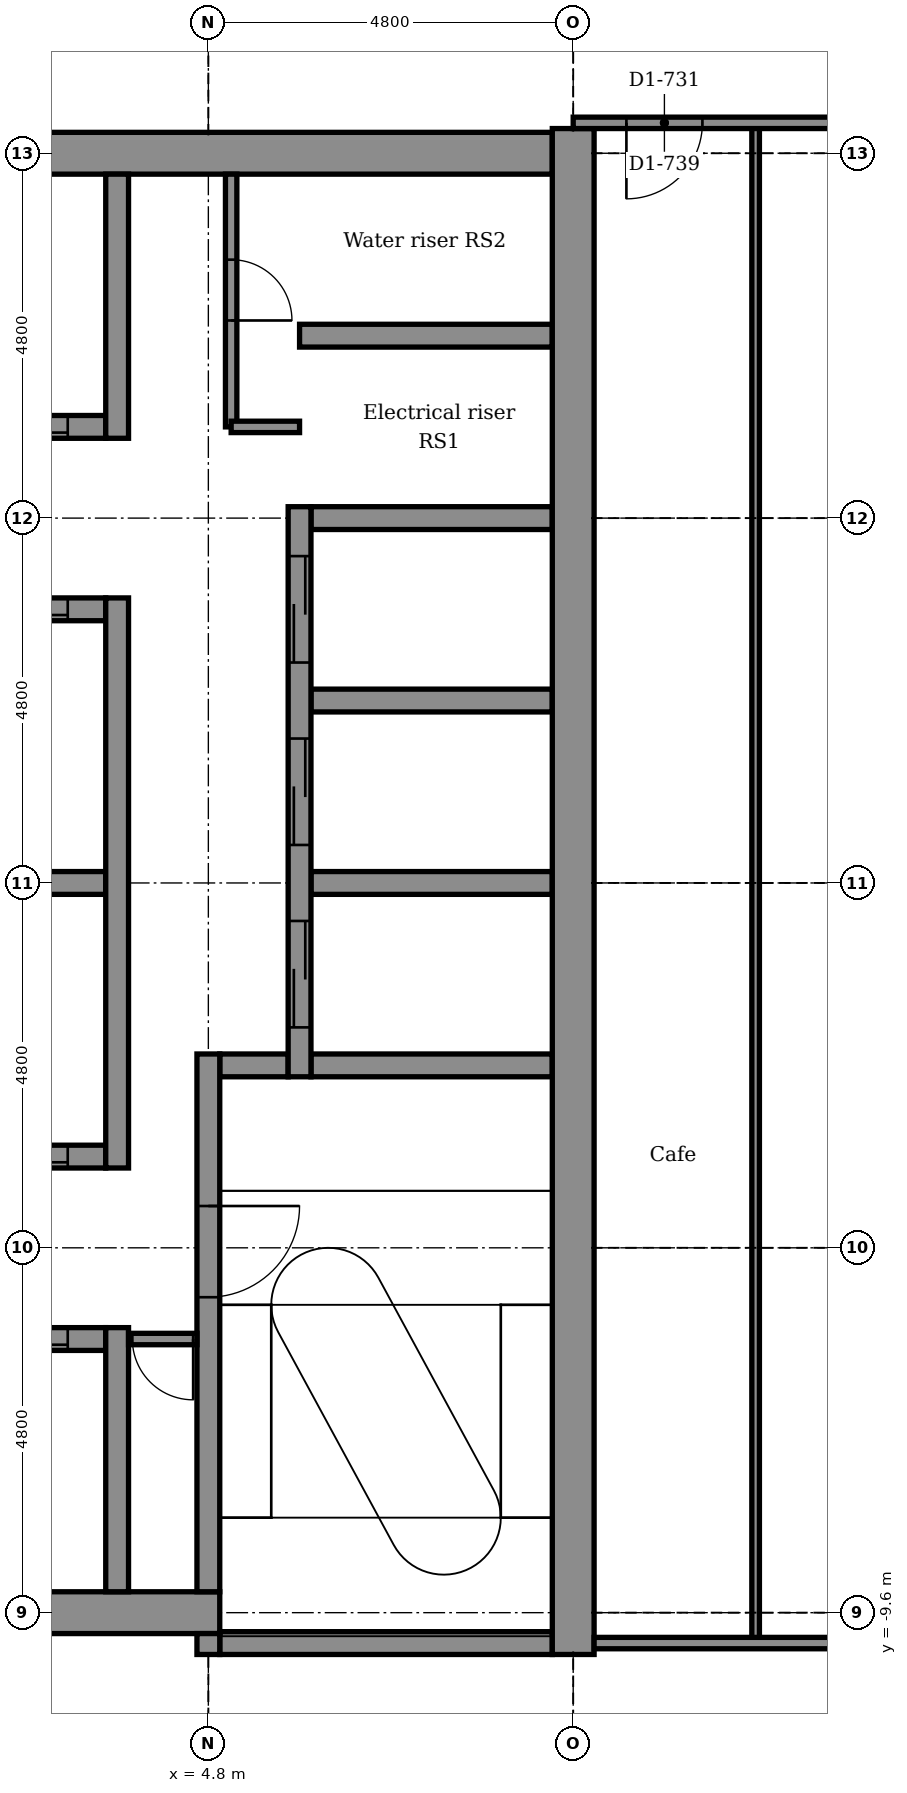
"""IFC4 building model, lengths in metres.
Left out: names, types, materials, properties, quantities, classifications, styles, units other than length and angle.
Written with IfcOpenShell. Run it as: python <this file> out.ifc"""

import sys

from ifc_helpers import new_model, si_unit, direction, frame, frame_2d, origin, place, context, subcontext, project, spatial, rectangle, extrude, element, fill, save


model = new_model("IFC4")
c1 = context("Model", 3, precision=1e-05, world=origin(), true_north=direction((0.0, 1.0)))
c2 = subcontext(c1, "Body", "Model", "MODEL_VIEW")
j1 = project(units=[si_unit("LENGTHUNIT", "METRE"), si_unit("PLANEANGLEUNIT", "RADIAN")], contexts=[c1])
p1 = place(None, origin())
s1 = spatial("IfcSite", under=j1, at=p1, CompositionType="ELEMENT")
p2 = place(p1, origin())
s2 = spatial("IfcBuilding", under=s1, at=p2, CompositionType="ELEMENT")
p3 = place(p2, frame((0.0, 0.0, 273.5)))
s3 = spatial("IfcBuildingStorey", under=s2, at=p3, CompositionType="ELEMENT", Elevation=273.5)
p4 = place(p3, frame((4.95, -10.0, -0.15), z_axis=(0.0, 0.0, 1.0), x_axis=(1.0, 0.0, 0.0)))
e1 = element("IfcWall", 1, at=p4, inside=s3, PredefinedType="STANDARD", context=c2, shape_type="SweptSolid", body=[
    extrude(rectangle(XDim=4.375, YDim=0.3, at=frame_2d((2.188, 0.0))), origin(), (0.0, 0.0, 1.0), 3.9),
])
p5 = place(p3, frame((-5.25, -9.6, -0.15), z_axis=(0.0, 0.0, 1.0), x_axis=(1.0, 0.0, 0.0)))
e2 = element("IfcWall", 2, at=p5, inside=s3, PredefinedType="SHEAR", context=c2, shape_type="SweptSolid", body=[
    extrude(rectangle(XDim=10.2, YDim=0.55, at=frame_2d((5.1, 0.0))), origin(), (0.0, 0.0, 1.0), 3.9),
])
p6 = place(p5, frame((0.6, 0.0, 0.15)))
e3 = element("IfcOpeningElement", 3, at=p6, cuts=e2, PredefinedType="OPENING", context=c2, shape_type="SweptSolid", body=[
    extrude(rectangle(XDim=0.9, YDim=2.1, at=frame_2d((0.45, 1.05))), frame((0.0, 0.285, 0.0), z_axis=(0.0, -1.0, 0.0), x_axis=(1.0, 0.0, 0.0)), (0.0, 0.0, 1.0), 0.57),
])
p7 = place(p3, frame((1.35, -6.0, -0.15), z_axis=(0.0, 0.0, 1.0), x_axis=(1.0, 0.0, 0.0)))
e4 = element("IfcWall", 4, at=p7, inside=s3, PredefinedType="STANDARD", context=c2, shape_type="SweptSolid", body=[
    extrude(rectangle(XDim=2.1, YDim=0.3, at=frame_2d((1.05, 0.0))), origin(), (0.0, 0.0, 1.0), 3.9),
])
p8 = place(p7, frame((0.5, 0.0, 0.15)))
e5 = element("IfcOpeningElement", 5, at=p8, cuts=e4, PredefinedType="OPENING", context=c2, shape_type="SweptSolid", body=[
    extrude(rectangle(XDim=1.1, YDim=2.1, at=frame_2d((0.55, 1.05))), frame((0.0, 0.16, 0.0), z_axis=(0.0, -1.0, 0.0), x_axis=(1.0, 0.0, 0.0)), (0.0, 0.0, 1.0), 0.32),
])
p9 = place(p3, frame((1.35, -3.6, -0.15), z_axis=(0.0, 0.0, 1.0), x_axis=(1.0, 0.0, 0.0)))
e6 = element("IfcWall", 6, at=p9, inside=s3, PredefinedType="STANDARD", context=c2, shape_type="SweptSolid", body=[
    extrude(rectangle(XDim=2.1, YDim=0.3, at=frame_2d((1.05, 0.0))), origin(), (0.0, 0.0, 1.0), 3.9),
])
p10 = place(p9, frame((0.5, 0.0, 0.15)))
e7 = element("IfcOpeningElement", 7, at=p10, cuts=e6, PredefinedType="OPENING", context=c2, shape_type="SweptSolid", body=[
    extrude(rectangle(XDim=1.1, YDim=2.1, at=frame_2d((0.55, 1.05))), frame((0.0, 0.16, 0.0), z_axis=(0.0, -1.0, 0.0), x_axis=(1.0, 0.0, 0.0)), (0.0, 0.0, 1.0), 0.32),
])
p11 = place(p3, frame((4.95, -2.4, -0.15), z_axis=(0.0, 0.0, 1.0), x_axis=(1.0, 0.0, 0.0)))
e8 = element("IfcWall", 8, at=p11, inside=s3, PredefinedType="STANDARD", context=c2, shape_type="SweptSolid", body=[
    extrude(rectangle(XDim=0.9, YDim=0.3, at=frame_2d((0.45, 0.0))), origin(), (0.0, 0.0, 1.0), 3.9),
])
p12 = place(p3, frame((6.15, -2.4, -0.15), z_axis=(0.0, 0.0, 1.0), x_axis=(1.0, 0.0, 0.0)))
e9 = element("IfcWall", 9, at=p12, inside=s3, PredefinedType="STANDARD", context=c2, shape_type="SweptSolid", body=[
    extrude(rectangle(XDim=3.175, YDim=0.3, at=frame_2d((1.587, 0.0))), origin(), (0.0, 0.0, 1.0), 3.9),
])
p13 = place(p3, frame((1.35, 0.0, -0.15), z_axis=(0.0, 0.0, 1.0), x_axis=(1.0, 0.0, 0.0)))
e10 = element("IfcWall", 10, at=p13, inside=s3, PredefinedType="STANDARD", context=c2, shape_type="SweptSolid", body=[
    extrude(rectangle(XDim=2.1, YDim=0.3, at=frame_2d((1.05, 0.0))), origin(), (0.0, 0.0, 1.0), 3.9),
])
for number, where, z_axis, x_axis in (
    (11, (6.15, 0.0, -0.15), (0.0, 0.0, 1.0), (1.0, 0.0, 0.0)),
    (12, (6.15, 2.4, -0.15), (0.0, 0.0, 1.0), (1.0, 0.0, 0.0)),
):
    element("IfcWall", number, at=place(p3, frame(where, z_axis=z_axis, x_axis=x_axis)), inside=s3, PredefinedType="STANDARD", context=c2, shape_type="SweptSolid", body=[
        extrude(rectangle(XDim=3.175, YDim=0.3, at=frame_2d((1.587, 0.0))), origin(), (0.0, 0.0, 1.0), 3.9),
    ])
p14 = place(p3, frame((1.35, 3.6, -0.15), z_axis=(0.0, 0.0, 1.0), x_axis=(1.0, 0.0, 0.0)))
e13 = element("IfcWall", 13, at=p14, inside=s3, PredefinedType="STANDARD", context=c2, shape_type="SweptSolid", body=[
    extrude(rectangle(XDim=2.1, YDim=0.3, at=frame_2d((1.05, 0.0))), origin(), (0.0, 0.0, 1.0), 3.9),
])
p15 = place(p14, frame((0.5, 0.0, 0.15)))
e14 = element("IfcOpeningElement", 14, at=p15, cuts=e13, PredefinedType="OPENING", context=c2, shape_type="SweptSolid", body=[
    extrude(rectangle(XDim=1.1, YDim=2.1, at=frame_2d((0.55, 1.05))), frame((0.0, 0.16, 0.0), z_axis=(0.0, -1.0, 0.0), x_axis=(1.0, 0.0, 0.0)), (0.0, 0.0, 1.0), 0.32),
])
p16 = place(p3, frame((6.15, 4.8, -0.15), z_axis=(0.0, 0.0, 1.0), x_axis=(1.0, 0.0, 0.0)))
e15 = element("IfcWall", 15, at=p16, inside=s3, PredefinedType="STANDARD", context=c2, shape_type="SweptSolid", body=[
    extrude(rectangle(XDim=3.175, YDim=0.3, at=frame_2d((1.587, 0.0))), origin(), (0.0, 0.0, 1.0), 3.9),
])
p17 = place(p3, frame((1.35, 6.0, -0.15), z_axis=(0.0, 0.0, 1.0), x_axis=(1.0, 0.0, 0.0)))
e16 = element("IfcWall", 16, at=p17, inside=s3, PredefinedType="STANDARD", context=c2, shape_type="SweptSolid", body=[
    extrude(rectangle(XDim=2.1, YDim=0.3, at=frame_2d((1.05, 0.0))), origin(), (0.0, 0.0, 1.0), 3.9),
])
p18 = place(p17, frame((0.5, 0.0, 0.15)))
e17 = element("IfcOpeningElement", 17, at=p18, cuts=e16, PredefinedType="OPENING", context=c2, shape_type="SweptSolid", body=[
    extrude(rectangle(XDim=1.1, YDim=2.1, at=frame_2d((0.55, 1.05))), frame((0.0, 0.16, 0.0), z_axis=(0.0, -1.0, 0.0), x_axis=(1.0, 0.0, 0.0)), (0.0, 0.0, 1.0), 0.32),
])
p19 = place(p3, frame((6.0, 7.2, -0.15), z_axis=(0.0, 0.0, 1.0), x_axis=(1.0, 0.0, 0.0)))
e18 = element("IfcWall", 18, at=p19, inside=s3, PredefinedType="STANDARD", context=c2, shape_type="SweptSolid", body=[
    extrude(rectangle(XDim=3.325, YDim=0.3, at=frame_2d((1.663, 0.0))), origin(), (0.0, 0.0, 1.0), 3.9),
])
p20 = place(p3, frame((-5.25, 9.6, -0.15), z_axis=(0.0, 0.0, 1.0), x_axis=(1.0, 0.0, 0.0)))
e19 = element("IfcWall", 19, at=p20, inside=s3, PredefinedType="SHEAR", context=c2, shape_type="SweptSolid", body=[
    extrude(rectangle(XDim=14.575, YDim=0.55, at=frame_2d((7.288, 0.0))), origin(), (0.0, 0.0, 1.0), 3.9),
])
p21 = place(p20, frame((0.6, 0.0, 0.15)))
e20 = element("IfcOpeningElement", 20, at=p21, cuts=e19, PredefinedType="OPENING", context=c2, shape_type="SweptSolid", body=[
    extrude(rectangle(XDim=0.9, YDim=2.1, at=frame_2d((0.45, 1.05))), frame((0.0, 0.285, 0.0), z_axis=(0.0, -1.0, 0.0), x_axis=(1.0, 0.0, 0.0)), (0.0, 0.0, 1.0), 0.57),
])
p22 = place(p3, frame((3.6, -9.325, -0.15), z_axis=(0.0, 0.0, 1.0), x_axis=(0.0, 1.0, 0.0)))
e21 = element("IfcWall", 21, at=p22, inside=s3, PredefinedType="STANDARD", context=c2, shape_type="SweptSolid", body=[
    extrude(rectangle(XDim=3.475, YDim=0.3, at=frame_2d((1.737, 0.0))), origin(), (0.0, 0.0, 1.0), 3.9),
])
p23 = place(p3, frame((3.6, -3.75, -0.15), z_axis=(0.0, 0.0, 1.0), x_axis=(0.0, 1.0, 0.0)))
e22 = element("IfcWall", 22, at=p23, inside=s3, PredefinedType="STANDARD", context=c2, shape_type="SweptSolid", body=[
    extrude(rectangle(XDim=7.5, YDim=0.3, at=frame_2d((3.75, 0.0))), origin(), (0.0, 0.0, 1.0), 3.9),
])
p24 = place(p3, frame((3.6, 5.85, -0.15), z_axis=(0.0, 0.0, 1.0), x_axis=(0.0, 1.0, 0.0)))
e23 = element("IfcWall", 23, at=p24, inside=s3, PredefinedType="STANDARD", context=c2, shape_type="SweptSolid", body=[
    extrude(rectangle(XDim=3.475, YDim=0.3, at=frame_2d((1.737, 0.0))), origin(), (0.0, 0.0, 1.0), 3.9),
])
p25 = place(p3, frame((4.8, -10.15, -0.15), z_axis=(0.0, 0.0, 1.0), x_axis=(0.0, 1.0, 0.0)))
e24 = element("IfcWall", 24, at=p25, inside=s3, PredefinedType="STANDARD", context=c2, shape_type="SweptSolid", body=[
    extrude(rectangle(XDim=0.275, YDim=0.3, at=frame_2d((0.137, 0.0))), origin(), (0.0, 0.0, 1.0), 3.9),
])
p26 = place(p3, frame((4.8, -9.325, -0.15), z_axis=(0.0, 0.0, 1.0), x_axis=(0.0, 1.0, 0.0)))
e25 = element("IfcWall", 25, at=p26, inside=s3, PredefinedType="STANDARD", context=c2, shape_type="SweptSolid", body=[
    extrude(rectangle(XDim=7.075, YDim=0.3, at=frame_2d((3.538, 0.0))), origin(), (0.0, 0.0, 1.0), 3.9),
])
p27 = place(p26, frame((3.875, 0.0, 0.15)))
e26 = element("IfcOpeningElement", 26, at=p27, cuts=e25, PredefinedType="OPENING", context=c2, shape_type="SweptSolid", body=[
    extrude(rectangle(XDim=1.2, YDim=2.1, at=frame_2d((0.6, 1.05))), frame((0.0, 0.16, 0.0), z_axis=(0.0, -1.0, 0.0), x_axis=(1.0, 0.0, 0.0)), (0.0, 0.0, 1.0), 0.32),
])
p28 = place(p3, frame((6.0, -2.55, -0.15), z_axis=(0.0, 0.0, 1.0), x_axis=(0.0, 1.0, 0.0)))
e27 = element("IfcWall", 27, at=p28, inside=s3, PredefinedType="STANDARD", context=c2, shape_type="SweptSolid", body=[
    extrude(rectangle(XDim=7.5, YDim=0.3, at=frame_2d((3.75, 0.0))), origin(), (0.0, 0.0, 1.0), 3.9),
])
p29 = place(p28, frame((0.65, 0.0, 0.15)))
e28 = element("IfcOpeningElement", 28, at=p29, cuts=e27, PredefinedType="OPENING", context=c2, shape_type="SweptSolid", body=[
    extrude(rectangle(XDim=1.4, YDim=2.1, at=frame_2d((0.7, 1.05))), frame((0.0, 0.16, 0.0), z_axis=(0.0, -1.0, 0.0), x_axis=(1.0, 0.0, 0.0)), (0.0, 0.0, 1.0), 0.32),
])
p30 = place(p28, frame((3.05, 0.0, 0.15)))
e29 = element("IfcOpeningElement", 29, at=p30, cuts=e27, PredefinedType="OPENING", context=c2, shape_type="SweptSolid", body=[
    extrude(rectangle(XDim=1.4, YDim=2.1, at=frame_2d((0.7, 1.05))), frame((0.0, 0.16, 0.0), z_axis=(0.0, -1.0, 0.0), x_axis=(1.0, 0.0, 0.0)), (0.0, 0.0, 1.0), 0.32),
])
p31 = place(p28, frame((5.45, 0.0, 0.15)))
e30 = element("IfcOpeningElement", 30, at=p31, cuts=e27, PredefinedType="OPENING", context=c2, shape_type="SweptSolid", body=[
    extrude(rectangle(XDim=1.4, YDim=2.1, at=frame_2d((0.7, 1.05))), frame((0.0, 0.16, 0.0), z_axis=(0.0, -1.0, 0.0), x_axis=(1.0, 0.0, 0.0)), (0.0, 0.0, 1.0), 0.32),
])
p32 = place(p3, frame((9.6, -10.15, -0.15), z_axis=(0.0, 0.0, 1.0), x_axis=(0.0, 1.0, 0.0)))
e31 = element("IfcWall", 31, at=p32, inside=s3, PredefinedType="SHEAR", context=c2, shape_type="SweptSolid", body=[
    extrude(rectangle(XDim=20.075, YDim=0.55, at=frame_2d((10.038, 0.0))), origin(), (0.0, 0.0, 1.0), 3.9),
])
p33 = place(p3, frame((12.0, -10.0, 0.0), z_axis=(0.0, 0.0, 1.0), x_axis=(0.0, 1.0, 0.0)))
e32 = element("IfcWall", 32, at=p33, inside=s3, PredefinedType="PARTITIONING", context=c2, shape_type="SweptSolid", body=[
    extrude(rectangle(XDim=20.0, YDim=0.1, at=frame_2d((10.0, 0.0))), origin(), (0.0, 0.0, 1.0), 3.75),
])
p34 = place(p3, frame((5.1, 6.0, 0.0), z_axis=(0.0, 0.0, 1.0), x_axis=(0.0, 1.0, 0.0)))
e33 = element("IfcWall", 33, at=p34, inside=s3, PredefinedType="PARTITIONING", context=c2, shape_type="SweptSolid", body=[
    extrude(rectangle(XDim=3.325, YDim=0.15, at=frame_2d((1.663, 0.0))), origin(), (0.0, 0.0, 1.0), 3.75),
])
p35 = place(p34, frame((1.4, 0.0, 0.0)))
e34 = element("IfcOpeningElement", 34, at=p35, cuts=e33, PredefinedType="OPENING", context=c2, shape_type="SweptSolid", body=[
    extrude(rectangle(XDim=0.8, YDim=2.1, at=frame_2d((0.4, 1.05))), frame((0.0, 0.085, 0.0), z_axis=(0.0, -1.0, 0.0), x_axis=(1.0, 0.0, 0.0)), (0.0, 0.0, 1.0), 0.17),
])
p36 = place(p3, frame((9.875, -10.0, 0.0), z_axis=(0.0, 0.0, 1.0), x_axis=(1.0, 0.0, 0.0)))
e35 = element("IfcWall", 35, at=p36, inside=s3, PredefinedType="PARTITIONING", context=c2, shape_type="SweptSolid", body=[
    extrude(rectangle(XDim=4.68, YDim=0.15, at=frame_2d((2.34, 0.0))), origin(), (0.0, 0.0, 1.0), 3.75),
])
p37 = place(p3, frame((3.75, -6.0, 0.0), z_axis=(0.0, 0.0, 1.0), x_axis=(1.0, 0.0, 0.0)))
e36 = element("IfcWall", 36, at=p37, inside=s3, PredefinedType="PARTITIONING", context=c2, shape_type="SweptSolid", body=[
    extrude(rectangle(XDim=0.9, YDim=0.15, at=frame_2d((0.45, 0.0))), origin(), (0.0, 0.0, 1.0), 3.75),
])
p38 = place(p37, frame((0.05, 0.0, 0.0)))
e37 = element("IfcOpeningElement", 37, at=p38, cuts=e36, PredefinedType="OPENING", context=c2, shape_type="SweptSolid", body=[
    extrude(rectangle(XDim=0.8, YDim=2.1, at=frame_2d((0.4, 1.05))), frame((0.0, 0.085, 0.0), z_axis=(0.0, -1.0, 0.0), x_axis=(1.0, 0.0, 0.0)), (0.0, 0.0, 1.0), 0.17),
])
p39 = place(p3, frame((5.1, 6.0, 0.0), z_axis=(0.0, 0.0, 1.0), x_axis=(1.0, 0.0, 0.0)))
e38 = element("IfcWall", 38, at=p39, inside=s3, PredefinedType="PARTITIONING", context=c2, shape_type="SweptSolid", body=[
    extrude(rectangle(XDim=0.9, YDim=0.15, at=frame_2d((0.45, 0.0))), origin(), (0.0, 0.0, 1.0), 3.75),
])
p40 = place(p3, frame((9.6, 10.0, 0.0), z_axis=(0.0, 0.0, 1.0), x_axis=(1.0, 0.0, 0.0)))
e39 = element("IfcWall", 39, at=p40, inside=s3, PredefinedType="PARTITIONING", context=c2, shape_type="SweptSolid", body=[
    extrude(rectangle(XDim=4.955, YDim=0.15, at=frame_2d((2.477, 0.0))), origin(), (0.0, 0.0, 1.0), 3.75),
])
p41 = place(p40, frame((0.7, 0.0, 0.0)))
e40 = element("IfcOpeningElement", 40, at=p41, cuts=e39, PredefinedType="OPENING", context=c2, shape_type="SweptSolid", body=[
    extrude(rectangle(XDim=1.0, YDim=2.1, at=frame_2d((0.5, 1.05))), frame((0.0, 0.085, 0.0), z_axis=(0.0, -1.0, 0.0), x_axis=(1.0, 0.0, 0.0)), (0.0, 0.0, 1.0), 0.17),
])
p42 = place(p35, frame((0.8, 0.0, 0.0), z_axis=(0.0, 0.0, 1.0), x_axis=(-1.0, 0.0, 0.0)))
e41 = element("IfcDoor", 41, at=p42, inside=s3, OperationType="SINGLE_SWING_LEFT", PredefinedType="DOOR", context=c2, shape_type="SweptSolid", body=[
    extrude(rectangle(XDim=0.8, YDim=2.1, at=frame_2d((0.4, 1.05))), frame((0.0, 0.025, 0.0), z_axis=(0.0, -1.0, 0.0), x_axis=(1.0, 0.0, 0.0)), (0.0, 0.0, 1.0), 0.05),
])
fill(e34, e41)
p43 = place(p38, frame((0.8, 0.0, 0.0), z_axis=(0.0, 0.0, 1.0), x_axis=(-1.0, 0.0, 0.0)))
e42 = element("IfcDoor", 42, at=p43, inside=s3, OperationType="SINGLE_SWING_RIGHT", PredefinedType="DOOR", context=c2, shape_type="SweptSolid", body=[
    extrude(rectangle(XDim=0.8, YDim=2.1, at=frame_2d((0.4, 1.05))), frame((0.0, 0.025, 0.0), z_axis=(0.0, -1.0, 0.0), x_axis=(1.0, 0.0, 0.0)), (0.0, 0.0, 1.0), 0.05),
])
fill(e37, e42)
p44 = place(p41, frame((1.0, 0.0, 0.0), z_axis=(0.0, 0.0, 1.0), x_axis=(-1.0, 0.0, 0.0)))
e43 = element("IfcDoor", 43, at=p44, inside=s3, OperationType="SINGLE_SWING_LEFT", PredefinedType="DOOR", context=c2, shape_type="SweptSolid", body=[
    extrude(rectangle(XDim=1.0, YDim=2.1, at=frame_2d((0.5, 1.05))), frame((0.0, 0.025, 0.0), z_axis=(0.0, -1.0, 0.0), x_axis=(1.0, 0.0, 0.0)), (0.0, 0.0, 1.0), 0.05),
])
fill(e40, e43)
p45 = place(p29, origin())
e44 = element("IfcDoor", 44, at=p45, inside=s3, OperationType="DOUBLE_DOOR_SLIDING", PredefinedType="DOOR", context=c2, shape_type="SweptSolid", body=[
    extrude(rectangle(XDim=1.4, YDim=2.1, at=frame_2d((0.7, 1.05))), frame((0.0, 0.025, 0.0), z_axis=(0.0, -1.0, 0.0), x_axis=(1.0, 0.0, 0.0)), (0.0, 0.0, 1.0), 0.05),
])
fill(e28, e44)
p46 = place(p30, origin())
e45 = element("IfcDoor", 45, at=p46, inside=s3, OperationType="DOUBLE_DOOR_SLIDING", PredefinedType="DOOR", context=c2, shape_type="SweptSolid", body=[
    extrude(rectangle(XDim=1.4, YDim=2.1, at=frame_2d((0.7, 1.05))), frame((0.0, 0.025, 0.0), z_axis=(0.0, -1.0, 0.0), x_axis=(1.0, 0.0, 0.0)), (0.0, 0.0, 1.0), 0.05),
])
fill(e29, e45)
p47 = place(p31, origin())
e46 = element("IfcDoor", 46, at=p47, inside=s3, OperationType="DOUBLE_DOOR_SLIDING", PredefinedType="DOOR", context=c2, shape_type="SweptSolid", body=[
    extrude(rectangle(XDim=1.4, YDim=2.1, at=frame_2d((0.7, 1.05))), frame((0.0, 0.025, 0.0), z_axis=(0.0, -1.0, 0.0), x_axis=(1.0, 0.0, 0.0)), (0.0, 0.0, 1.0), 0.05),
])
fill(e30, e46)
p48 = place(p18, origin())
e47 = element("IfcDoor", 47, at=p48, inside=s3, OperationType="DOUBLE_DOOR_SLIDING", PredefinedType="DOOR", context=c2, shape_type="SweptSolid", body=[
    extrude(rectangle(XDim=1.1, YDim=2.1, at=frame_2d((0.55, 1.05))), frame((0.0, 0.025, 0.0), z_axis=(0.0, -1.0, 0.0), x_axis=(1.0, 0.0, 0.0)), (0.0, 0.0, 1.0), 0.05),
])
fill(e17, e47)
p49 = place(p15, origin())
e48 = element("IfcDoor", 48, at=p49, inside=s3, OperationType="DOUBLE_DOOR_SLIDING", PredefinedType="DOOR", context=c2, shape_type="SweptSolid", body=[
    extrude(rectangle(XDim=1.1, YDim=2.1, at=frame_2d((0.55, 1.05))), frame((0.0, 0.025, 0.0), z_axis=(0.0, -1.0, 0.0), x_axis=(1.0, 0.0, 0.0)), (0.0, 0.0, 1.0), 0.05),
])
fill(e14, e48)
p50 = place(p10, origin())
e49 = element("IfcDoor", 49, at=p50, inside=s3, OperationType="DOUBLE_DOOR_SLIDING", PredefinedType="DOOR", context=c2, shape_type="SweptSolid", body=[
    extrude(rectangle(XDim=1.1, YDim=2.1, at=frame_2d((0.55, 1.05))), frame((0.0, 0.025, 0.0), z_axis=(0.0, -1.0, 0.0), x_axis=(1.0, 0.0, 0.0)), (0.0, 0.0, 1.0), 0.05),
])
fill(e7, e49)
p51 = place(p8, origin())
e50 = element("IfcDoor", 50, at=p51, inside=s3, OperationType="DOUBLE_DOOR_SLIDING", PredefinedType="DOOR", context=c2, shape_type="SweptSolid", body=[
    extrude(rectangle(XDim=1.1, YDim=2.1, at=frame_2d((0.55, 1.05))), frame((0.0, 0.025, 0.0), z_axis=(0.0, -1.0, 0.0), x_axis=(1.0, 0.0, 0.0)), (0.0, 0.0, 1.0), 0.05),
])
fill(e5, e50)
p52 = place(p27, frame((1.2, 0.0, 0.0), z_axis=(0.0, 0.0, 1.0), x_axis=(-1.0, 0.0, 0.0)))
e51 = element("IfcDoor", 51, at=p52, inside=s3, OperationType="SINGLE_SWING_RIGHT", PredefinedType="DOOR", context=c2, shape_type="SweptSolid", body=[
    extrude(rectangle(XDim=1.2, YDim=2.1, at=frame_2d((0.6, 1.05))), frame((0.0, 0.025, 0.0), z_axis=(0.0, -1.0, 0.0), x_axis=(1.0, 0.0, 0.0)), (0.0, 0.0, 1.0), 0.05),
])
fill(e26, e51)
save(model, sys.argv[1])
